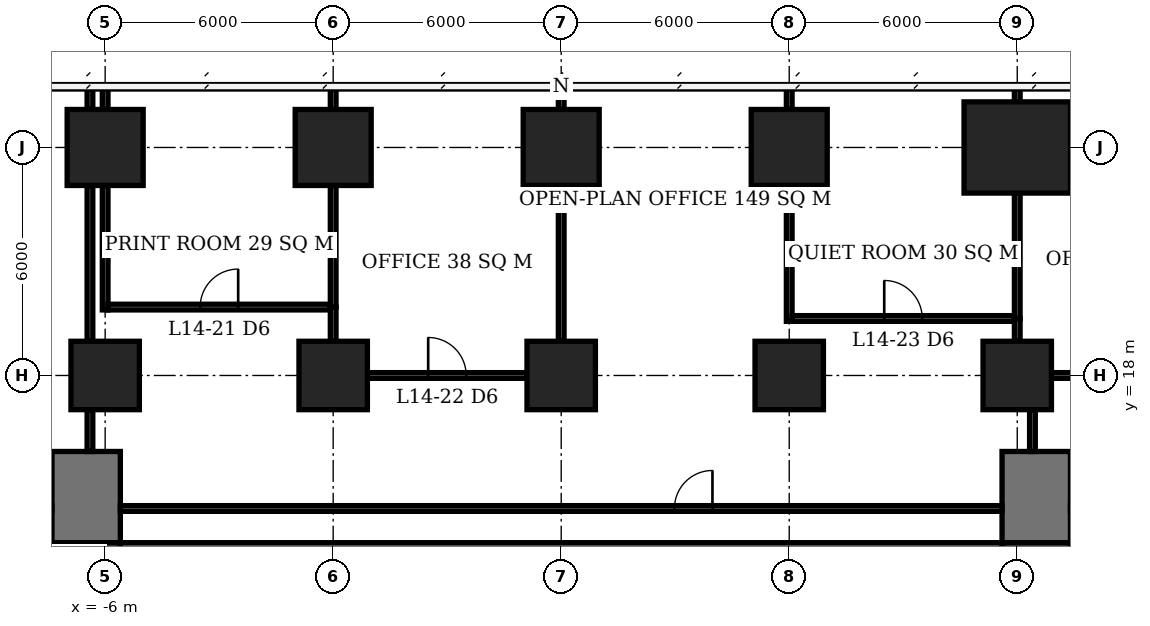
"""IFC4 building model, lengths in metres.
Left out: names, types, materials, properties, quantities, classifications, styles, units other than length and angle.
Written with IfcOpenShell. Run it as: python <this file> out.ifc"""

import sys

from ifc_helpers import new_model, si_unit, direction, frame, frame_2d, origin, origin_2d, place, context, subcontext, project, spatial, rectangle, extrude, element, fill, save


model = new_model("IFC4")
c1 = context("Model", 3, precision=1e-05, world=origin(), true_north=direction((0.0, 1.0)))
c2 = subcontext(c1, "Body", "Model", "MODEL_VIEW")
j1 = project(units=[si_unit("LENGTHUNIT", "METRE"), si_unit("PLANEANGLEUNIT", "RADIAN")], contexts=[c1])
p1 = place(None, origin())
s1 = spatial("IfcSite", under=j1, at=p1, CompositionType="ELEMENT")
p2 = place(p1, origin())
s2 = spatial("IfcBuilding", under=s1, at=p2, CompositionType="ELEMENT")
p3 = place(p2, frame((0.0, 0.0, 61.1)))
s3 = spatial("IfcBuildingStorey", under=s2, at=p3, CompositionType="ELEMENT", Elevation=61.1)
p4 = place(p3, frame((-6.0, 18.0, 0.0), z_axis=(0.0, 0.0, 1.0), x_axis=(1.0, 0.0, 0.0)))
e1 = element("IfcColumn", 1, at=p4, inside=s3, PredefinedType="COLUMN", context=c2, shape_type="SweptSolid", body=[
    extrude(rectangle(XDim=1.8, YDim=1.8, at=origin_2d()), origin(), (0.0, 0.0, 1.0), 3.9),
])
p5 = place(p3, frame((-6.0, 24.0, 0.0), z_axis=(0.0, 0.0, 1.0), x_axis=(1.0, 0.0, 0.0)))
e2 = element("IfcColumn", 2, at=p5, inside=s3, PredefinedType="COLUMN", context=c2, shape_type="SweptSolid", body=[
    extrude(rectangle(XDim=2.0, YDim=2.0, at=origin_2d()), origin(), (0.0, 0.0, 1.0), 3.9),
])
p6 = place(p3, frame((0.0, 18.0, 0.0), z_axis=(0.0, 0.0, 1.0), x_axis=(1.0, 0.0, 0.0)))
e3 = element("IfcColumn", 3, at=p6, inside=s3, PredefinedType="COLUMN", context=c2, shape_type="SweptSolid", body=[
    extrude(rectangle(XDim=1.8, YDim=1.8, at=origin_2d()), origin(), (0.0, 0.0, 1.0), 3.9),
])
p7 = place(p3, frame((0.0, 24.0, 0.0), z_axis=(0.0, 0.0, 1.0), x_axis=(1.0, 0.0, 0.0)))
e4 = element("IfcColumn", 4, at=p7, inside=s3, PredefinedType="COLUMN", context=c2, shape_type="SweptSolid", body=[
    extrude(rectangle(XDim=2.0, YDim=2.0, at=origin_2d()), origin(), (0.0, 0.0, 1.0), 3.9),
])
p8 = place(p3, frame((6.0, 18.0, 0.0), z_axis=(0.0, 0.0, 1.0), x_axis=(1.0, 0.0, 0.0)))
e5 = element("IfcColumn", 5, at=p8, inside=s3, PredefinedType="COLUMN", context=c2, shape_type="SweptSolid", body=[
    extrude(rectangle(XDim=1.8, YDim=1.8, at=origin_2d()), origin(), (0.0, 0.0, 1.0), 3.9),
])
p9 = place(p3, frame((6.0, 24.0, 0.0), z_axis=(0.0, 0.0, 1.0), x_axis=(1.0, 0.0, 0.0)))
e6 = element("IfcColumn", 6, at=p9, inside=s3, PredefinedType="COLUMN", context=c2, shape_type="SweptSolid", body=[
    extrude(rectangle(XDim=2.0, YDim=2.0, at=origin_2d()), origin(), (0.0, 0.0, 1.0), 3.9),
])
p10 = place(p3, frame((12.0, 18.0, 0.0), z_axis=(0.0, 0.0, 1.0), x_axis=(1.0, 0.0, 0.0)))
e7 = element("IfcColumn", 7, at=p10, inside=s3, PredefinedType="COLUMN", context=c2, shape_type="SweptSolid", body=[
    extrude(rectangle(XDim=1.8, YDim=1.8, at=origin_2d()), origin(), (0.0, 0.0, 1.0), 3.9),
])
p11 = place(p3, frame((12.0, 24.0, 0.0), z_axis=(0.0, 0.0, 1.0), x_axis=(1.0, 0.0, 0.0)))
e8 = element("IfcColumn", 8, at=p11, inside=s3, PredefinedType="COLUMN", context=c2, shape_type="SweptSolid", body=[
    extrude(rectangle(XDim=2.0, YDim=2.0, at=origin_2d()), origin(), (0.0, 0.0, 1.0), 3.9),
])
p12 = place(p3, frame((18.0, 18.0, 0.0), z_axis=(0.0, 0.0, 1.0), x_axis=(1.0, 0.0, 0.0)))
e9 = element("IfcColumn", 9, at=p12, inside=s3, PredefinedType="COLUMN", context=c2, shape_type="SweptSolid", body=[
    extrude(rectangle(XDim=1.8, YDim=1.8, at=origin_2d()), origin(), (0.0, 0.0, 1.0), 3.9),
])
p13 = place(p3, frame((18.0, 24.0, 0.0), z_axis=(0.0, 0.0, 1.0), x_axis=(1.0, 0.0, 0.0)))
e10 = element("IfcColumn", 10, at=p13, inside=s3, PredefinedType="COLUMN", context=c2, shape_type="SweptSolid", body=[
    extrude(rectangle(XDim=2.8, YDim=2.4, at=origin_2d()), origin(), (0.0, 0.0, 1.0), 3.9),
])
p14 = place(p3, frame((-5.6, 12.6, 0.0), z_axis=(0.0, 0.0, 1.0), x_axis=(1.0, 0.0, 0.0)))
e11 = element("IfcWall", 11, at=p14, inside=s3, PredefinedType="SHEAR", context=c2, shape_type="SweptSolid", body=[
    extrude(rectangle(XDim=23.2, YDim=2.0, at=frame_2d((11.6, 0.0))), origin(), (0.0, 0.0, 1.0), 3.9),
])
p15 = place(p3, frame((-6.5, -7.6, 0.0), z_axis=(0.0, 0.0, 1.0), x_axis=(0.0, 1.0, 0.0)))
e12 = element("IfcWall", 12, at=p15, inside=s3, PredefinedType="SHEAR", context=c2, shape_type="SweptSolid", body=[
    extrude(rectangle(XDim=21.2, YDim=1.8, at=frame_2d((10.6, 0.0))), origin(), (0.0, 0.0, 1.0), 3.9),
])
p16 = place(p15, frame((7.8, 0.0, 0.0)))
e13 = element("IfcOpeningElement", 13, at=p16, cuts=e12, PredefinedType="OPENING", context=c2, shape_type="SweptSolid", body=[
    extrude(rectangle(XDim=1.8, YDim=2.4, at=frame_2d((0.9, 1.2))), frame((0.0, 0.91, 0.0), z_axis=(0.0, -1.0, 0.0), x_axis=(1.0, 0.0, 0.0)), (0.0, 0.0, 1.0), 1.82),
])
p17 = place(p3, frame((18.5, -7.6, 0.0), z_axis=(0.0, 0.0, 1.0), x_axis=(0.0, 1.0, 0.0)))
e14 = element("IfcWall", 14, at=p17, inside=s3, PredefinedType="SHEAR", context=c2, shape_type="SweptSolid", body=[
    extrude(rectangle(XDim=21.2, YDim=1.8, at=frame_2d((10.6, 0.0))), origin(), (0.0, 0.0, 1.0), 3.9),
])
p18 = place(p17, frame((9.2, 0.0, 0.0)))
e15 = element("IfcOpeningElement", 15, at=p18, cuts=e14, PredefinedType="OPENING", context=c2, shape_type="SweptSolid", body=[
    extrude(rectangle(XDim=1.8, YDim=2.4, at=frame_2d((0.9, 1.2))), frame((0.0, 0.91, 0.0), z_axis=(0.0, -1.0, 0.0), x_axis=(1.0, 0.0, 0.0)), (0.0, 0.0, 1.0), 1.82),
])
for number, where, z_axis, x_axis in (
    (16, (-6.5, 13.6, 0.0), (0.0, 0.0, 1.0), (0.0, 1.0, 0.0)),
    (17, (18.5, 13.6, 0.0), (0.0, 0.0, 1.0), (0.0, 1.0, 0.0)),
):
    element("IfcWall", number, at=place(p3, frame(where, z_axis=z_axis, x_axis=x_axis)), inside=s3, PredefinedType="SHEAR", context=c2, shape_type="SweptSolid", body=[
        extrude(rectangle(XDim=2.4, YDim=1.8, at=frame_2d((1.2, 0.0))), origin(), (0.0, 0.0, 1.0), 3.9),
    ])
p19 = place(p3, frame((0.9, 18.0, 0.0), z_axis=(0.0, 0.0, 1.0), x_axis=(1.0, 0.0, 0.0)))
e18 = element("IfcWall", 18, at=p19, inside=s3, PredefinedType="PARTITIONING", context=c2, shape_type="SweptSolid", body=[
    extrude(rectangle(XDim=4.2, YDim=0.15, at=frame_2d((2.1, 0.0))), origin(), (0.0, 0.0, 1.0), 3.65),
])
p20 = place(p19, frame((1.6, 0.0, 0.0)))
e19 = element("IfcOpeningElement", 19, at=p20, cuts=e18, PredefinedType="OPENING", context=c2, shape_type="SweptSolid", body=[
    extrude(rectangle(XDim=1.0, YDim=2.1, at=frame_2d((0.5, 1.05))), frame((0.0, 0.085, 0.0), z_axis=(0.0, -1.0, 0.0), x_axis=(1.0, 0.0, 0.0)), (0.0, 0.0, 1.0), 0.17),
])
p21 = place(p3, frame((18.9, 18.0, 0.0), z_axis=(0.0, 0.0, 1.0), x_axis=(1.0, 0.0, 0.0)))
e20 = element("IfcWall", 20, at=p21, inside=s3, PredefinedType="PARTITIONING", context=c2, shape_type="SweptSolid", body=[
    extrude(rectangle(XDim=3.8, YDim=0.15, at=frame_2d((1.9, 0.0))), origin(), (0.0, 0.0, 1.0), 3.65),
])
p22 = place(p21, frame((1.4, 0.0, 0.0)))
e21 = element("IfcOpeningElement", 21, at=p22, cuts=e20, PredefinedType="OPENING", context=c2, shape_type="SweptSolid", body=[
    extrude(rectangle(XDim=1.0, YDim=2.1, at=frame_2d((0.5, 1.05))), frame((0.0, 0.085, 0.0), z_axis=(0.0, -1.0, 0.0), x_axis=(1.0, 0.0, 0.0)), (0.0, 0.0, 1.0), 0.17),
])
p23 = place(p3, frame((12.075, 19.5, 0.0), z_axis=(0.0, 0.0, 1.0), x_axis=(1.0, 0.0, 0.0)))
e22 = element("IfcWall", 22, at=p23, inside=s3, PredefinedType="PARTITIONING", context=c2, shape_type="SweptSolid", body=[
    extrude(rectangle(XDim=5.85, YDim=0.15, at=frame_2d((2.925, 0.0))), origin(), (0.0, 0.0, 1.0), 3.65),
])
p24 = place(p23, frame((2.425, 0.0, 0.0)))
e23 = element("IfcOpeningElement", 23, at=p24, cuts=e22, PredefinedType="OPENING", context=c2, shape_type="SweptSolid", body=[
    extrude(rectangle(XDim=1.0, YDim=2.1, at=frame_2d((0.5, 1.05))), frame((0.0, 0.085, 0.0), z_axis=(0.0, -1.0, 0.0), x_axis=(1.0, 0.0, 0.0)), (0.0, 0.0, 1.0), 0.17),
])
p25 = place(p3, frame((-5.925, 19.8, 0.0), z_axis=(0.0, 0.0, 1.0), x_axis=(1.0, 0.0, 0.0)))
e24 = element("IfcWall", 24, at=p25, inside=s3, PredefinedType="PARTITIONING", context=c2, shape_type="SweptSolid", body=[
    extrude(rectangle(XDim=5.85, YDim=0.15, at=frame_2d((2.925, 0.0))), origin(), (0.0, 0.0, 1.0), 3.65),
])
p26 = place(p25, frame((2.425, 0.0, 0.0)))
e25 = element("IfcOpeningElement", 25, at=p26, cuts=e24, PredefinedType="OPENING", context=c2, shape_type="SweptSolid", body=[
    extrude(rectangle(XDim=1.0, YDim=2.1, at=frame_2d((0.5, 1.05))), frame((0.0, 0.085, 0.0), z_axis=(0.0, -1.0, 0.0), x_axis=(1.0, 0.0, 0.0)), (0.0, 0.0, 1.0), 0.17),
])
p27 = place(p3, frame((-6.0, 19.725, 0.0), z_axis=(0.0, 0.0, 1.0), x_axis=(0.0, 1.0, 0.0)))
e26 = element("IfcWall", 26, at=p27, inside=s3, PredefinedType="PARTITIONING", context=c2, shape_type="SweptSolid", body=[
    extrude(rectangle(XDim=3.275, YDim=0.15, at=frame_2d((1.637, 0.0))), origin(), (0.0, 0.0, 1.0), 3.65),
])
p28 = place(p3, frame((-6.0, 25.0, 0.0), z_axis=(0.0, 0.0, 1.0), x_axis=(0.0, 1.0, 0.0)))
e27 = element("IfcWall", 27, at=p28, inside=s3, PredefinedType="PARTITIONING", context=c2, shape_type="SweptSolid", body=[
    extrude(rectangle(XDim=0.6, YDim=0.15, at=frame_2d((0.3, 0.0))), origin(), (0.0, 0.0, 1.0), 2.65),
])
p29 = place(p3, frame((0.0, 18.9, 0.0), z_axis=(0.0, 0.0, 1.0), x_axis=(0.0, 1.0, 0.0)))
e28 = element("IfcWall", 28, at=p29, inside=s3, PredefinedType="PARTITIONING", context=c2, shape_type="SweptSolid", body=[
    extrude(rectangle(XDim=0.9, YDim=0.15, at=frame_2d((0.45, 0.0))), origin(), (0.0, 0.0, 1.0), 3.65),
])
p30 = place(p3, frame((0.0, 19.8, 0.0), z_axis=(0.0, 0.0, 1.0), x_axis=(0.0, 1.0, 0.0)))
e29 = element("IfcWall", 29, at=p30, inside=s3, PredefinedType="PARTITIONING", context=c2, shape_type="SweptSolid", body=[
    extrude(rectangle(XDim=3.2, YDim=0.15, at=frame_2d((1.6, 0.0))), origin(), (0.0, 0.0, 1.0), 3.65),
])
p31 = place(p3, frame((0.0, 25.0, 0.0), z_axis=(0.0, 0.0, 1.0), x_axis=(0.0, 1.0, 0.0)))
e30 = element("IfcWall", 30, at=p31, inside=s3, PredefinedType="PARTITIONING", context=c2, shape_type="SweptSolid", body=[
    extrude(rectangle(XDim=0.6, YDim=0.15, at=frame_2d((0.3, 0.0))), origin(), (0.0, 0.0, 1.0), 2.65),
])
p32 = place(p3, frame((6.0, 18.9, 0.0), z_axis=(0.0, 0.0, 1.0), x_axis=(0.0, 1.0, 0.0)))
e31 = element("IfcWall", 31, at=p32, inside=s3, PredefinedType="PARTITIONING", context=c2, shape_type="SweptSolid", body=[
    extrude(rectangle(XDim=4.1, YDim=0.15, at=frame_2d((2.05, 0.0))), origin(), (0.0, 0.0, 1.0), 3.65),
])
p33 = place(p3, frame((6.0, 25.0, 0.0), z_axis=(0.0, 0.0, 1.0), x_axis=(0.0, 1.0, 0.0)))
e32 = element("IfcWall", 32, at=p33, inside=s3, PredefinedType="PARTITIONING", context=c2, shape_type="SweptSolid", body=[
    extrude(rectangle(XDim=0.55, YDim=0.15, at=frame_2d((0.275, 0.0))), origin(), (0.0, 0.0, 1.0), 2.65),
])
p34 = place(p3, frame((12.0, 19.425, 0.0), z_axis=(0.0, 0.0, 1.0), x_axis=(0.0, 1.0, 0.0)))
e33 = element("IfcWall", 33, at=p34, inside=s3, PredefinedType="PARTITIONING", context=c2, shape_type="SweptSolid", body=[
    extrude(rectangle(XDim=3.575, YDim=0.15, at=frame_2d((1.788, 0.0))), origin(), (0.0, 0.0, 1.0), 3.65),
])
p35 = place(p3, frame((12.0, 25.0, 0.0), z_axis=(0.0, 0.0, 1.0), x_axis=(0.0, 1.0, 0.0)))
e34 = element("IfcWall", 34, at=p35, inside=s3, PredefinedType="PARTITIONING", context=c2, shape_type="SweptSolid", body=[
    extrude(rectangle(XDim=0.6, YDim=0.15, at=frame_2d((0.3, 0.0))), origin(), (0.0, 0.0, 1.0), 2.65),
])
p36 = place(p3, frame((18.0, 18.9, 0.0), z_axis=(0.0, 0.0, 1.0), x_axis=(0.0, 1.0, 0.0)))
e35 = element("IfcWall", 35, at=p36, inside=s3, PredefinedType="PARTITIONING", context=c2, shape_type="SweptSolid", body=[
    extrude(rectangle(XDim=0.6, YDim=0.15, at=frame_2d((0.3, 0.0))), origin(), (0.0, 0.0, 1.0), 3.65),
])
p37 = place(p3, frame((18.0, 19.5, 0.0), z_axis=(0.0, 0.0, 1.0), x_axis=(0.0, 1.0, 0.0)))
e36 = element("IfcWall", 36, at=p37, inside=s3, PredefinedType="PARTITIONING", context=c2, shape_type="SweptSolid", body=[
    extrude(rectangle(XDim=3.3, YDim=0.15, at=frame_2d((1.65, 0.0))), origin(), (0.0, 0.0, 1.0), 3.65),
])
p38 = place(p3, frame((18.0, 25.2, 0.0), z_axis=(0.0, 0.0, 1.0), x_axis=(0.0, 1.0, 0.0)))
e37 = element("IfcWall", 37, at=p38, inside=s3, PredefinedType="PARTITIONING", context=c2, shape_type="SweptSolid", body=[
    extrude(rectangle(XDim=0.4, YDim=0.15, at=frame_2d((0.2, 0.0))), origin(), (0.0, 0.0, 1.0), 2.65),
])
p39 = place(p3, frame((-6.4, 16.0, 0.0), z_axis=(0.0, 0.0, 1.0), x_axis=(0.0, 1.0, 0.0)))
e38 = element("IfcWall", 38, at=p39, inside=s3, PredefinedType="PARTITIONING", context=c2, shape_type="SweptSolid", body=[
    extrude(rectangle(XDim=1.1, YDim=0.15, at=frame_2d((0.55, 0.0))), origin(), (0.0, 0.0, 1.0), 3.65),
])
p40 = place(p3, frame((-6.4, 18.9, 0.0), z_axis=(0.0, 0.0, 1.0), x_axis=(0.0, 1.0, 0.0)))
e39 = element("IfcWall", 39, at=p40, inside=s3, PredefinedType="PARTITIONING", context=c2, shape_type="SweptSolid", body=[
    extrude(rectangle(XDim=4.1, YDim=0.15, at=frame_2d((2.05, 0.0))), origin(), (0.0, 0.0, 1.0), 3.65),
])
p41 = place(p3, frame((-6.4, 25.0, 0.0), z_axis=(0.0, 0.0, 1.0), x_axis=(0.0, 1.0, 0.0)))
e40 = element("IfcWall", 40, at=p41, inside=s3, PredefinedType="PARTITIONING", context=c2, shape_type="SweptSolid", body=[
    extrude(rectangle(XDim=0.55, YDim=0.15, at=frame_2d((0.275, 0.0))), origin(), (0.0, 0.0, 1.0), 2.65),
])
p42 = place(p3, frame((-5.6, 14.5, 0.0), z_axis=(0.0, 0.0, 1.0), x_axis=(1.0, 0.0, 0.0)))
e41 = element("IfcWall", 41, at=p42, inside=s3, PredefinedType="PARTITIONING", context=c2, shape_type="SweptSolid", body=[
    extrude(rectangle(XDim=23.2, YDim=0.15, at=frame_2d((11.6, 0.0))), origin(), (0.0, 0.0, 1.0), 3.65),
])
p43 = place(p42, frame((14.58, 0.0, 0.0)))
e42 = element("IfcOpeningElement", 42, at=p43, cuts=e41, PredefinedType="OPENING", context=c2, shape_type="SweptSolid", body=[
    extrude(rectangle(XDim=1.0, YDim=2.1, at=frame_2d((0.5, 1.05))), frame((0.0, 0.085, 0.0), z_axis=(0.0, -1.0, 0.0), x_axis=(1.0, 0.0, 0.0)), (0.0, 0.0, 1.0), 0.17),
])
p44 = place(p3, frame((18.4, 16.0, 0.0), z_axis=(0.0, 0.0, 1.0), x_axis=(0.0, 1.0, 0.0)))
e43 = element("IfcWall", 43, at=p44, inside=s3, PredefinedType="PARTITIONING", context=c2, shape_type="SweptSolid", body=[
    extrude(rectangle(XDim=1.1, YDim=0.15, at=frame_2d((0.55, 0.0))), origin(), (0.0, 0.0, 1.0), 3.65),
])
p45 = place(p3, frame((19.4, 14.5, 0.0), z_axis=(0.0, 0.0, 1.0), x_axis=(1.0, 0.0, 0.0)))
e44 = element("IfcWall", 44, at=p45, inside=s3, PredefinedType="PARTITIONING", context=c2, shape_type="SweptSolid", body=[
    extrude(rectangle(XDim=1.175, YDim=0.15, at=frame_2d((0.587, 0.0))), origin(), (0.0, 0.0, 1.0), 3.65),
])
p46 = place(p26, origin())
e45 = element("IfcDoor", 45, at=p46, inside=s3, OperationType="SINGLE_SWING_RIGHT", PredefinedType="DOOR", context=c2, shape_type="SweptSolid", body=[
    extrude(rectangle(XDim=1.0, YDim=2.1, at=frame_2d((0.5, 1.05))), frame((0.0, 0.025, 0.0), z_axis=(0.0, -1.0, 0.0), x_axis=(1.0, 0.0, 0.0)), (0.0, 0.0, 1.0), 0.05),
])
fill(e25, e45)
p47 = place(p20, origin())
e46 = element("IfcDoor", 46, at=p47, inside=s3, OperationType="SINGLE_SWING_LEFT", PredefinedType="DOOR", context=c2, shape_type="SweptSolid", body=[
    extrude(rectangle(XDim=1.0, YDim=2.1, at=frame_2d((0.5, 1.05))), frame((0.0, 0.025, 0.0), z_axis=(0.0, -1.0, 0.0), x_axis=(1.0, 0.0, 0.0)), (0.0, 0.0, 1.0), 0.05),
])
fill(e19, e46)
p48 = place(p24, origin())
e47 = element("IfcDoor", 47, at=p48, inside=s3, OperationType="SINGLE_SWING_LEFT", PredefinedType="DOOR", context=c2, shape_type="SweptSolid", body=[
    extrude(rectangle(XDim=1.0, YDim=2.1, at=frame_2d((0.5, 1.05))), frame((0.0, 0.025, 0.0), z_axis=(0.0, -1.0, 0.0), x_axis=(1.0, 0.0, 0.0)), (0.0, 0.0, 1.0), 0.05),
])
fill(e23, e47)
p49 = place(p43, origin())
e48 = element("IfcDoor", 48, at=p49, inside=s3, OperationType="SINGLE_SWING_RIGHT", PredefinedType="DOOR", context=c2, shape_type="SweptSolid", body=[
    extrude(rectangle(XDim=1.0, YDim=2.1, at=frame_2d((0.5, 1.05))), frame((0.0, 0.025, 0.0), z_axis=(0.0, -1.0, 0.0), x_axis=(1.0, 0.0, 0.0)), (0.0, 0.0, 1.0), 0.05),
])
fill(e42, e48)
save(model, sys.argv[1])
